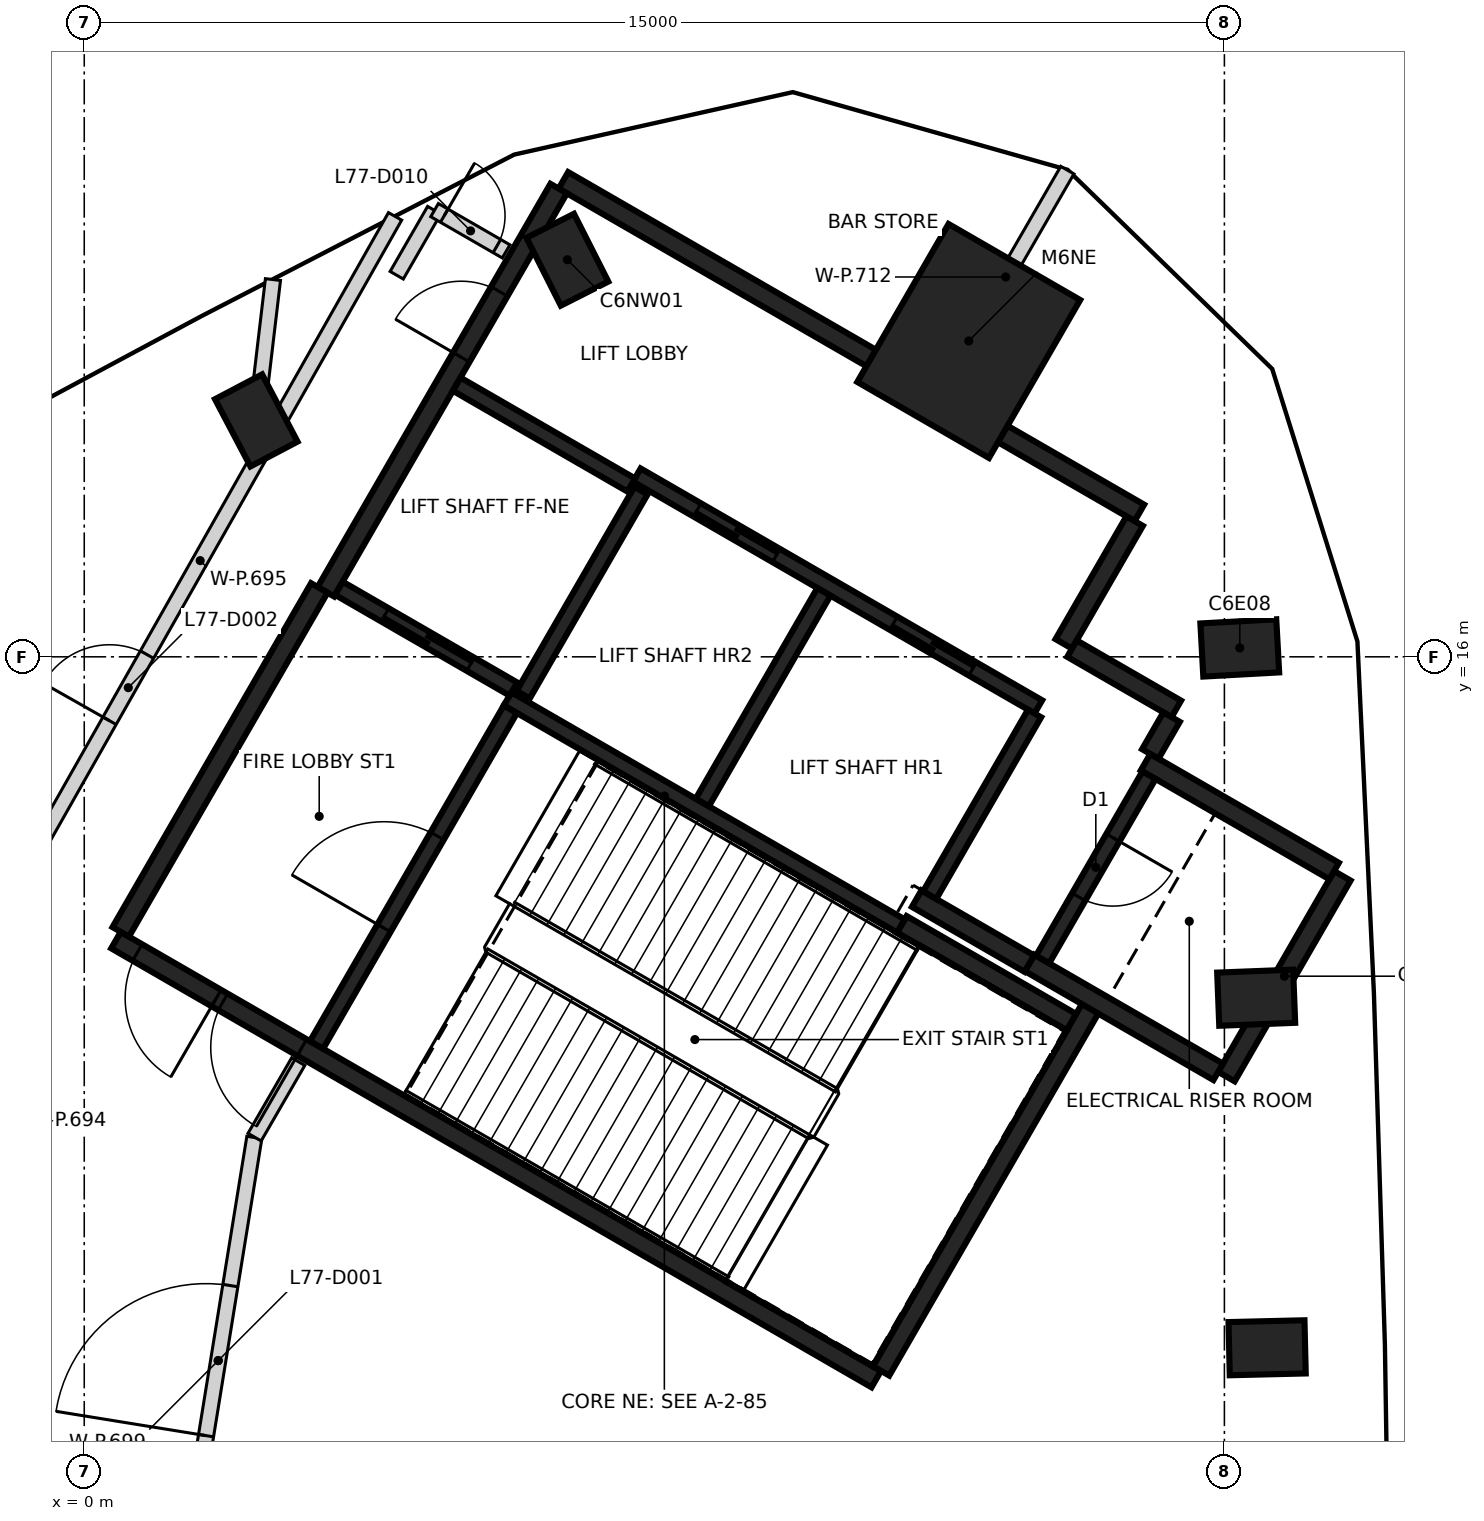
"""IFC4 building model, lengths in metres.
Left out: names, types, materials, properties, quantities, classifications, styles, units other than length and angle.
Written with IfcOpenShell. Run it as: python <this file> out.ifc"""

import sys

from ifc_helpers import new_model, si_unit, direction, frame, frame_2d, origin, origin_2d, place, context, subcontext, project, spatial, rectangle, extrude, element, fill, save


model = new_model("IFC4")
c1 = context("Model", 3, precision=1e-05, world=origin(), true_north=direction((0.0, 1.0)))
c2 = subcontext(c1, "Body", "Model", "MODEL_VIEW")
j1 = project(units=[si_unit("LENGTHUNIT", "METRE"), si_unit("PLANEANGLEUNIT", "RADIAN")], contexts=[c1])
p1 = place(None, origin())
s1 = spatial("IfcSite", under=j1, at=p1, CompositionType="ELEMENT")
p2 = place(p1, origin())
s2 = spatial("IfcBuilding", under=s1, at=p2, CompositionType="ELEMENT")
p3 = place(p2, frame((0.0, 0.0, 306.6)))
s3 = spatial("IfcBuildingStorey", under=s2, at=p3, CompositionType="ELEMENT", Elevation=306.6)
for number, where, z_axis, x_axis in (
    (1, (15.562, 6.91, -0.35), (0.0, 0.0, 1.0), (1.0, 0.024, 0.0)),
    (2, (15.418, 11.515, -0.35), (0.0, 0.0, 1.0), (0.999, 0.039, 0.0)),
    (3, (15.202, 16.117, -0.35), (0.0, 0.0, 1.0), (0.998, 0.055, 0.0)),
    (4, (6.356, 21.224, -0.35), (0.0, 0.0, 1.0), (-0.452, 0.892, 0.0)),
    (5, (2.263, 19.11, -0.35), (0.0, 0.0, 1.0), (-0.466, 0.885, 0.0)),
):
    element("IfcColumn", number, at=place(p3, frame(where, z_axis=z_axis, x_axis=x_axis)), inside=s3, PredefinedType="COLUMN", context=c2, shape_type="SweptSolid", body=[
        extrude(rectangle(XDim=1.0, YDim=0.7, at=origin_2d()), origin(), (0.0, 0.0, 1.0), 6.0),
    ])
p4 = place(p3, frame((11.637, 20.155, -0.35), z_axis=(0.0, 0.0, 1.0), x_axis=(0.5, 0.866025403784, 0.0)))
e6 = element("IfcColumn", 6, at=p4, inside=s3, PredefinedType="COLUMN", context=c2, shape_type="SweptSolid", body=[
    extrude(rectangle(XDim=2.4, YDim=2.0, at=origin_2d()), origin(), (0.0, 0.0, 1.0), 6.0),
])
p5 = place(p3, frame((10.42, 6.498, 0.0), z_axis=(0.0, 0.0, 1.0), x_axis=(-0.866021906294, 0.500006057782, 0.0)))
e7 = element("IfcWall", 7, at=p5, inside=s3, PredefinedType="SHEAR", context=c2, shape_type="SweptSolid", body=[
    extrude(rectangle(XDim=11.55, YDim=0.25, at=frame_2d((5.775, 0.0))), origin(), (0.0, 0.0, 1.0), 5.65),
])
p6 = place(p5, frame((10.025, 0.0, 0.0)))
e8 = element("IfcOpeningElement", 8, at=p6, cuts=e7, PredefinedType="OPENING", context=c2, shape_type="SweptSolid", body=[
    extrude(rectangle(XDim=1.2, YDim=2.1, at=frame_2d((0.6, 1.05))), frame((0.0, 0.135, 0.0), z_axis=(0.0, -1.0, 0.0), x_axis=(1.0, 0.0, 0.0)), (0.0, 0.0, 1.0), 0.27),
])
p7 = place(p5, frame((8.725, 0.0, 0.0)))
e9 = element("IfcOpeningElement", 9, at=p7, cuts=e7, PredefinedType="OPENING", context=c2, shape_type="SweptSolid", body=[
    extrude(rectangle(XDim=1.2, YDim=2.1, at=frame_2d((0.6, 1.05))), frame((0.0, 0.135, 0.0), z_axis=(0.0, -1.0, 0.0), x_axis=(1.0, 0.0, 0.0)), (0.0, 0.0, 1.0), 0.27),
])
p8 = place(p3, frame((6.304, 22.269, 0.0), z_axis=(0.0, 0.0, 1.0), x_axis=(0.866022959057, -0.500004234368, 0.0)))
e10 = element("IfcWall", 10, at=p8, inside=s3, PredefinedType="SHEAR", context=c2, shape_type="SweptSolid", body=[
    extrude(rectangle(XDim=8.75, YDim=0.25, at=frame_2d((4.375, 0.0))), origin(), (0.0, 0.0, 1.0), 5.65),
])
p9 = place(p3, frame((3.179, 16.856, 0.0), z_axis=(0.0, 0.0, 1.0), x_axis=(0.500001955336, 0.866024274868, 0.0)))
e11 = element("IfcWall", 11, at=p9, inside=s3, PredefinedType="SHEAR", context=c2, shape_type="SweptSolid", body=[
    extrude(rectangle(XDim=6.125, YDim=0.25, at=frame_2d((3.062, 0.0))), origin(), (0.0, 0.0, 1.0), 5.65),
])
p10 = place(p9, frame((3.563, 0.0, 0.0)))
e12 = element("IfcOpeningElement", 12, at=p10, cuts=e11, PredefinedType="OPENING", context=c2, shape_type="SweptSolid", body=[
    extrude(rectangle(XDim=1.0, YDim=2.1, at=frame_2d((0.5, 1.05))), frame((0.0, 0.135, 0.0), z_axis=(0.0, -1.0, 0.0), x_axis=(1.0, 0.0, 0.0)), (0.0, 0.0, 1.0), 0.27),
])
p11 = place(p3, frame((0.48, 12.381, 0.0), z_axis=(0.0, 0.0, 1.0), x_axis=(0.49999885962, 0.866026062182, 0.0)))
e13 = element("IfcWall", 13, at=p11, inside=s3, PredefinedType="SHEAR", context=c2, shape_type="SweptSolid", body=[
    extrude(rectangle(XDim=5.225, YDim=0.25, at=frame_2d((2.612, 0.0))), origin(), (0.0, 0.0, 1.0), 5.65),
])
p12 = place(p3, frame((13.238, 11.378, 0.0), z_axis=(0.0, 0.0, 1.0), x_axis=(-0.500008851346, -0.866020293397, 0.0)))
e14 = element("IfcWall", 14, at=p12, inside=s3, PredefinedType="SHEAR", context=c2, shape_type="SweptSolid", body=[
    extrude(rectangle(XDim=5.51, YDim=0.25, at=frame_2d((2.755, 0.0))), origin(), (0.0, 0.0, 1.0), 5.65),
])
p13 = place(p3, frame((16.552, 13.119, 0.0), z_axis=(0.0, 0.0, 1.0), x_axis=(-0.499978833458, -0.866037623948, 0.0)))
e15 = element("IfcWall", 15, at=p13, inside=s3, PredefinedType="SHEAR", context=c2, shape_type="SweptSolid", body=[
    extrude(rectangle(XDim=3.05, YDim=0.25, at=frame_2d((1.525, 0.0))), origin(), (0.0, 0.0, 1.0), 5.65),
])
p14 = place(p3, frame((14.918, 10.54, 0.0), z_axis=(0.0, 0.0, 1.0), x_axis=(-0.866063538972, 0.499933942099, 0.0)))
e16 = element("IfcWall", 16, at=p14, inside=s3, PredefinedType="SHEAR", context=c2, shape_type="SweptSolid", body=[
    extrude(rectangle(XDim=2.865, YDim=0.25, at=frame_2d((1.432, 0.0))), origin(), (0.0, 0.0, 1.0), 5.65),
])
p15 = place(p3, frame((13.963, 14.614, 0.0), z_axis=(0.0, 0.0, 1.0), x_axis=(0.866042235819, -0.499970844928, 0.0)))
e17 = element("IfcWall", 17, at=p15, inside=s3, PredefinedType="SHEAR", context=c2, shape_type="SweptSolid", body=[
    extrude(rectangle(XDim=2.865, YDim=0.25, at=frame_2d((1.432, 0.0))), origin(), (0.0, 0.0, 1.0), 5.65),
])
p16 = place(p3, frame((10.757, 12.481, 0.0), z_axis=(0.0, 0.0, 1.0), x_axis=(0.866022940537, -0.500004266446, 0.0)))
e18 = element("IfcWall", 18, at=p16, inside=s3, PredefinedType="SHEAR", context=c2, shape_type="SweptSolid", body=[
    extrude(rectangle(XDim=2.575, YDim=0.25, at=frame_2d((1.287, 0.0))), origin(), (0.0, 0.0, 1.0), 5.65),
])
p17 = place(p3, frame((13.819, 17.785, 0.0), z_axis=(0.0, 0.0, 1.0), x_axis=(-0.500039802285, -0.866002422705, 0.0)))
e19 = element("IfcWall", 19, at=p17, inside=s3, PredefinedType="SHEAR", context=c2, shape_type="SweptSolid", body=[
    extrude(rectangle(XDim=1.865, YDim=0.25, at=frame_2d((0.932, 0.0))), origin(), (0.0, 0.0, 1.0), 5.65),
])
p18 = place(p3, frame((12.433, 11.964, 0.0), z_axis=(0.0, 0.0, 1.0), x_axis=(-0.866038183914, 0.499977863513, 0.0)))
e20 = element("IfcWall", 20, at=p18, inside=s3, PredefinedType="SHEAR", context=c2, shape_type="SweptSolid", body=[
    extrude(rectangle(XDim=1.71, YDim=0.25, at=frame_2d((0.855, 0.0))), origin(), (0.0, 0.0, 1.0), 5.65),
])
p19 = place(p3, frame((12.995, 16.108, 0.0), z_axis=(0.0, 0.0, 1.0), x_axis=(0.866044474677, -0.49996696679, 0.0)))
e21 = element("IfcWall", 21, at=p19, inside=s3, PredefinedType="SHEAR", context=c2, shape_type="SweptSolid", body=[
    extrude(rectangle(XDim=1.584, YDim=0.25, at=frame_2d((0.792, 0.0))), origin(), (0.0, 0.0, 1.0), 5.65),
])
p20 = place(p3, frame((14.305, 15.207, 0.0), z_axis=(0.0, 0.0, 1.0), x_axis=(-0.499848422343, -0.866112899501, 0.0)))
e22 = element("IfcWall", 22, at=p20, inside=s3, PredefinedType="SHEAR", context=c2, shape_type="SweptSolid", body=[
    extrude(rectangle(XDim=0.559, YDim=0.25, at=frame_2d((0.28, 0.0))), origin(), (0.0, 0.0, 1.0), 5.65),
])
p21 = place(p3, frame((12.552, 15.342, 0.0), z_axis=(0.0, 0.0, 1.0), x_axis=(-0.866030299012, 0.499991521122, 0.0)))
e23 = element("IfcWall", 23, at=p21, inside=s3, PredefinedType="SHEAR", context=c2, shape_type="SweptSolid", body=[
    extrude(rectangle(XDim=6.1, YDim=0.2, at=frame_2d((3.05, 0.0))), origin(), (0.0, 0.0, 1.0), 5.65),
])
p22 = place(p21, frame((1.0, 0.0, 0.0)))
e24 = element("IfcOpeningElement", 24, at=p22, cuts=e23, PredefinedType="OPENING", context=c2, shape_type="SweptSolid", body=[
    extrude(rectangle(XDim=1.2, YDim=2.1, at=frame_2d((0.6, 1.05))), frame((0.0, 0.11, 0.0), z_axis=(0.0, -1.0, 0.0), x_axis=(1.0, 0.0, 0.0)), (0.0, 0.0, 1.0), 0.22),
])
p23 = place(p21, frame((3.982, 0.0, 0.0)))
e25 = element("IfcOpeningElement", 25, at=p23, cuts=e23, PredefinedType="OPENING", context=c2, shape_type="SweptSolid", body=[
    extrude(rectangle(XDim=1.2, YDim=2.1, at=frame_2d((0.6, 1.05))), frame((0.0, 0.11, 0.0), z_axis=(0.0, -1.0, 0.0), x_axis=(1.0, 0.0, 0.0)), (0.0, 0.0, 1.0), 0.22),
])
p24 = place(p3, frame((10.743, 12.46, 0.0), z_axis=(0.0, 0.0, 1.0), x_axis=(-0.866018848283, 0.500011354289, 0.0)))
e26 = element("IfcWall", 26, at=p24, inside=s3, PredefinedType="SHEAR", context=c2, shape_type="SweptSolid", body=[
    extrude(rectangle(XDim=5.974, YDim=0.2, at=frame_2d((2.987, 0.0))), origin(), (0.0, 0.0, 1.0), 5.65),
])
p25 = place(p3, frame((3.057, 10.895, 0.0), z_axis=(0.0, 0.0, 1.0), x_axis=(0.500027839223, 0.866009330205, 0.0)))
e27 = element("IfcWall", 27, at=p25, inside=s3, PredefinedType="SHEAR", context=c2, shape_type="SweptSolid", body=[
    extrude(rectangle(XDim=5.098, YDim=0.2, at=frame_2d((2.549, 0.0))), origin(), (0.0, 0.0, 1.0), 5.65),
])
p26 = place(p25, frame((1.774, 0.0, 0.0)))
e28 = element("IfcOpeningElement", 28, at=p26, cuts=e27, PredefinedType="OPENING", context=c2, shape_type="SweptSolid", body=[
    extrude(rectangle(XDim=1.4, YDim=2.1, at=frame_2d((0.7, 1.05))), frame((0.0, 0.11, 0.0), z_axis=(0.0, -1.0, 0.0), x_axis=(1.0, 0.0, 0.0)), (0.0, 0.0, 1.0), 0.22),
])
p27 = place(p3, frame((8.132, 14.084, 0.0), z_axis=(0.0, 0.0, 1.0), x_axis=(0.500030834389, 0.86600760081, 0.0)))
e29 = element("IfcWall", 29, at=p27, inside=s3, PredefinedType="SHEAR", context=c2, shape_type="SweptSolid", body=[
    extrude(rectangle(XDim=3.198, YDim=0.2, at=frame_2d((1.599, 0.0))), origin(), (0.0, 0.0, 1.0), 5.65),
])
p28 = place(p3, frame((14.008, 14.442, 0.0), z_axis=(0.0, 0.0, 1.0), x_axis=(-0.499986818241, -0.866033014143, 0.0)))
e30 = element("IfcWall", 30, at=p28, inside=s3, PredefinedType="SHEAR", context=c2, shape_type="SweptSolid", body=[
    extrude(rectangle(XDim=2.798, YDim=0.2, at=frame_2d((1.399, 0.0))), origin(), (0.0, 0.0, 1.0), 5.65),
])
p29 = place(p28, frame((0.949, 0.0, 0.0)))
e31 = element("IfcOpeningElement", 31, at=p29, cuts=e30, PredefinedType="OPENING", context=c2, shape_type="SweptSolid", body=[
    extrude(rectangle(XDim=0.9, YDim=2.1, at=frame_2d((0.45, 1.05))), frame((0.0, 0.11, 0.0), z_axis=(0.0, -1.0, 0.0), x_axis=(1.0, 0.0, 0.0)), (0.0, 0.0, 1.0), 0.22),
])
p30 = place(p3, frame((12.502, 15.255, 0.0), z_axis=(0.0, 0.0, 1.0), x_axis=(-0.499965018551, -0.866045599391, 0.0)))
e32 = element("IfcWall", 32, at=p30, inside=s3, PredefinedType="SHEAR", context=c2, shape_type="SweptSolid", body=[
    extrude(rectangle(XDim=2.759, YDim=0.2, at=frame_2d((1.379, 0.0))), origin(), (0.0, 0.0, 1.0), 5.65),
])
p31 = place(p3, frame((7.324, 18.187, 0.0), z_axis=(0.0, 0.0, 1.0), x_axis=(-0.499967891604, -0.866043940782, 0.0)))
e33 = element("IfcWall", 33, at=p31, inside=s3, PredefinedType="SHEAR", context=c2, shape_type="SweptSolid", body=[
    extrude(rectangle(XDim=3.1, YDim=0.2, at=frame_2d((1.55, 0.0))), origin(), (0.0, 0.0, 1.0), 5.65),
])
p32 = place(p3, frame((5.646, 15.576, 0.0), z_axis=(0.0, 0.0, 1.0), x_axis=(-0.866018407898, 0.500012117035, 0.0)))
e34 = element("IfcWall", 34, at=p32, inside=s3, PredefinedType="SHEAR", context=c2, shape_type="SweptSolid", body=[
    extrude(rectangle(XDim=2.651, YDim=0.2, at=frame_2d((1.325, 0.0))), origin(), (0.0, 0.0, 1.0), 5.65),
])
p33 = place(p32, frame((0.652, 0.0, 0.0)))
e35 = element("IfcOpeningElement", 35, at=p33, cuts=e34, PredefinedType="OPENING", context=c2, shape_type="SweptSolid", body=[
    extrude(rectangle(XDim=1.3, YDim=2.1, at=frame_2d((0.65, 1.05))), frame((0.0, 0.11, 0.0), z_axis=(0.0, -1.0, 0.0), x_axis=(1.0, 0.0, 0.0)), (0.0, 0.0, 1.0), 0.22),
])
p34 = place(p3, frame((7.196, 18.26, 0.0), z_axis=(0.0, 0.0, 1.0), x_axis=(-0.866018407898, 0.500012117035, 0.0)))
e36 = element("IfcWall", 36, at=p34, inside=s3, PredefinedType="SHEAR", context=c2, shape_type="SweptSolid", body=[
    extrude(rectangle(XDim=2.651, YDim=0.2, at=frame_2d((1.325, 0.0))), origin(), (0.0, 0.0, 1.0), 5.65),
])
p35 = place(p3, frame((-1.039, 12.736, 0.0), z_axis=(0.0, 0.0, 1.0), x_axis=(0.492629053188, 0.870239401518, 0.0)))
e37 = element("IfcWall", 37, at=p35, inside=s3, PredefinedType="PARTITIONING", context=c2, shape_type="SweptSolid", body=[
    extrude(rectangle(XDim=10.409, YDim=0.2, at=frame_2d((5.205, 0.0))), origin(), (0.0, 0.0, 1.0), 4.75),
])
p36 = place(p35, frame((2.784, 0.0, 0.0)))
e38 = element("IfcOpeningElement", 38, at=p36, cuts=e37, PredefinedType="OPENING", context=c2, shape_type="SweptSolid", body=[
    extrude(rectangle(XDim=1.0, YDim=2.1, at=frame_2d((0.5, 1.05))), frame((0.0, 0.11, 0.0), z_axis=(0.0, -1.0, 0.0), x_axis=(1.0, 0.0, 0.0)), (0.0, 0.0, 1.0), 0.22),
])
p37 = place(p3, frame((1.287, 3.806, 0.0), z_axis=(0.0, 0.0, 1.0), x_axis=(0.159910062187, 0.987131587992, 0.0)))
e39 = element("IfcWall", 39, at=p37, inside=s3, PredefinedType="PARTITIONING", context=c2, shape_type="SweptSolid", body=[
    extrude(rectangle(XDim=5.947, YDim=0.2, at=frame_2d((2.973, 0.0))), origin(), (0.0, 0.0, 1.0), 5.65),
])
p38 = place(p37, frame((1.973, 0.0, 0.0)))
e40 = element("IfcOpeningElement", 40, at=p38, cuts=e39, PredefinedType="OPENING", context=c2, shape_type="SweptSolid", body=[
    extrude(rectangle(XDim=2.0, YDim=2.1, at=frame_2d((1.0, 1.05))), frame((0.0, 0.11, 0.0), z_axis=(0.0, -1.0, 0.0), x_axis=(1.0, 0.0, 0.0)), (0.0, 0.0, 1.0), 0.22),
])
p39 = place(p3, frame((2.243, 18.939, 0.0), z_axis=(0.0, 0.0, 1.0), x_axis=(0.11751540525, 0.993071059657, 0.0)))
e41 = element("IfcWall", 41, at=p39, inside=s3, PredefinedType="PARTITIONING", context=c2, shape_type="SweptSolid", body=[
    extrude(rectangle(XDim=2.038, YDim=0.2, at=frame_2d((1.019, 0.0))), origin(), (0.0, 0.0, 1.0), 5.65),
])
p40 = place(p3, frame((2.241, 9.681, 0.0), z_axis=(0.0, 0.0, 1.0), x_axis=(0.500507931288, 0.865731950847, 0.0)))
e42 = element("IfcWall", 42, at=p40, inside=s3, PredefinedType="PARTITIONING", context=c2, shape_type="SweptSolid", body=[
    extrude(rectangle(XDim=1.148, YDim=0.2, at=frame_2d((0.574, 0.0))), origin(), (0.0, 0.0, 1.0), 5.65),
])
p41 = place(p3, frame((4.111, 21.02, 0.0), z_axis=(0.0, 0.0, 1.0), x_axis=(0.499037571515, 0.866580349545, 0.0)))
e43 = element("IfcWall", 43, at=p41, inside=s3, PredefinedType="PARTITIONING", context=c2, shape_type="SweptSolid", body=[
    extrude(rectangle(XDim=0.988, YDim=0.2, at=frame_2d((0.494, 0.0))), origin(), (0.0, 0.0, 1.0), 5.65),
])
p42 = place(p3, frame((4.609, 21.877, 0.0), z_axis=(0.0, 0.0, 1.0), x_axis=(0.866107068482, -0.499858525911, 0.0)))
e44 = element("IfcWall", 44, at=p42, inside=s3, PredefinedType="PARTITIONING", context=c2, shape_type="SweptSolid", body=[
    extrude(rectangle(XDim=1.087, YDim=0.2, at=frame_2d((0.543, 0.0))), origin(), (0.0, 0.0, 1.0), 5.65),
])
p43 = place(p42, frame((0.147, 0.0, 0.0)))
e45 = element("IfcOpeningElement", 45, at=p43, cuts=e44, PredefinedType="OPENING", context=c2, shape_type="SweptSolid", body=[
    extrude(rectangle(XDim=0.8, YDim=2.1, at=frame_2d((0.4, 1.05))), frame((0.0, 0.11, 0.0), z_axis=(0.0, -1.0, 0.0), x_axis=(1.0, 0.0, 0.0)), (0.0, 0.0, 1.0), 0.22),
])
p44 = place(p3, frame((11.311, 19.591, 0.0), z_axis=(0.0, 0.0, 1.0), x_axis=(0.499843986188, 0.866115459666, 0.0)))
e46 = element("IfcWall", 46, at=p44, inside=s3, PredefinedType="PARTITIONING", context=c2, shape_type="SweptSolid", body=[
    extrude(rectangle(XDim=3.246, YDim=0.2, at=frame_2d((1.623, 0.0))), origin(), (0.0, 0.0, 1.0), 5.65),
])
p45 = place(p33, origin())
e47 = element("IfcDoor", 47, at=p45, inside=s3, OperationType="SLIDING_TO_LEFT", PredefinedType="DOOR", context=c2, shape_type="SweptSolid", body=[
    extrude(rectangle(XDim=1.3, YDim=2.1, at=frame_2d((0.65, 1.05))), frame((0.0, 0.025, 0.0), z_axis=(0.0, -1.0, 0.0), x_axis=(1.0, 0.0, 0.0)), (0.0, 0.0, 1.0), 0.05),
])
fill(e35, e47)
p46 = place(p22, origin())
e48 = element("IfcDoor", 48, at=p46, inside=s3, OperationType="DOUBLE_DOOR_SLIDING", PredefinedType="DOOR", context=c2, shape_type="SweptSolid", body=[
    extrude(rectangle(XDim=1.2, YDim=2.1, at=frame_2d((0.6, 1.05))), frame((0.0, 0.025, 0.0), z_axis=(0.0, -1.0, 0.0), x_axis=(1.0, 0.0, 0.0)), (0.0, 0.0, 1.0), 0.05),
])
fill(e24, e48)
p47 = place(p23, origin())
e49 = element("IfcDoor", 49, at=p47, inside=s3, OperationType="DOUBLE_DOOR_SLIDING", PredefinedType="DOOR", context=c2, shape_type="SweptSolid", body=[
    extrude(rectangle(XDim=1.2, YDim=2.1, at=frame_2d((0.6, 1.05))), frame((0.0, 0.025, 0.0), z_axis=(0.0, -1.0, 0.0), x_axis=(1.0, 0.0, 0.0)), (0.0, 0.0, 1.0), 0.05),
])
fill(e25, e49)
p48 = place(p10, origin())
e50 = element("IfcDoor", 50, at=p48, inside=s3, OperationType="SINGLE_SWING_LEFT", PredefinedType="DOOR", context=c2, shape_type="SweptSolid", body=[
    extrude(rectangle(XDim=1.0, YDim=2.1, at=frame_2d((0.5, 1.05))), frame((0.0, 0.025, 0.0), z_axis=(0.0, -1.0, 0.0), x_axis=(1.0, 0.0, 0.0)), (0.0, 0.0, 1.0), 0.05),
])
fill(e12, e50)
p49 = place(p6, origin())
e51 = element("IfcDoor", 51, at=p49, inside=s3, OperationType="SINGLE_SWING_LEFT", PredefinedType="DOOR", context=c2, shape_type="SweptSolid", body=[
    extrude(rectangle(XDim=1.2, YDim=2.1, at=frame_2d((0.6, 1.05))), frame((0.0, 0.025, 0.0), z_axis=(0.0, -1.0, 0.0), x_axis=(1.0, 0.0, 0.0)), (0.0, 0.0, 1.0), 0.05),
])
fill(e8, e51)
p50 = place(p7, origin())
e52 = element("IfcDoor", 52, at=p50, inside=s3, OperationType="SINGLE_SWING_RIGHT", PredefinedType="DOOR", context=c2, shape_type="SweptSolid", body=[
    extrude(rectangle(XDim=1.2, YDim=2.1, at=frame_2d((0.6, 1.05))), frame((0.0, 0.025, 0.0), z_axis=(0.0, -1.0, 0.0), x_axis=(1.0, 0.0, 0.0)), (0.0, 0.0, 1.0), 0.05),
])
fill(e9, e52)
p51 = place(p26, origin())
e53 = element("IfcDoor", 53, at=p51, inside=s3, OperationType="SINGLE_SWING_LEFT", PredefinedType="DOOR", context=c2, shape_type="SweptSolid", body=[
    extrude(rectangle(XDim=1.4, YDim=2.1, at=frame_2d((0.7, 1.05))), frame((0.0, 0.025, 0.0), z_axis=(0.0, -1.0, 0.0), x_axis=(1.0, 0.0, 0.0)), (0.0, 0.0, 1.0), 0.05),
])
fill(e28, e53)
p52 = place(p29, origin())
e54 = element("IfcDoor", 54, at=p52, inside=s3, OperationType="SINGLE_SWING_RIGHT", PredefinedType="DOOR", context=c2, shape_type="SweptSolid", body=[
    extrude(rectangle(XDim=0.9, YDim=2.1, at=frame_2d((0.45, 1.05))), frame((0.0, 0.025, 0.0), z_axis=(0.0, -1.0, 0.0), x_axis=(1.0, 0.0, 0.0)), (0.0, 0.0, 1.0), 0.05),
])
fill(e31, e54)
p53 = place(p38, frame((2.0, 0.0, 0.0), z_axis=(0.0, 0.0, 1.0), x_axis=(-1.0, 0.0, 0.0)))
e55 = element("IfcDoor", 55, at=p53, inside=s3, OperationType="DOUBLE_DOOR_SINGLE_SWING", PredefinedType="DOOR", context=c2, shape_type="SweptSolid", body=[
    extrude(rectangle(XDim=2.0, YDim=2.1, at=frame_2d((1.0, 1.05))), frame((0.0, 0.025, 0.0), z_axis=(0.0, -1.0, 0.0), x_axis=(1.0, 0.0, 0.0)), (0.0, 0.0, 1.0), 0.05),
])
fill(e40, e55)
p54 = place(p36, origin())
e56 = element("IfcDoor", 56, at=p54, inside=s3, OperationType="SINGLE_SWING_LEFT", PredefinedType="DOOR", context=c2, shape_type="SweptSolid", body=[
    extrude(rectangle(XDim=1.0, YDim=2.1, at=frame_2d((0.5, 1.05))), frame((0.0, 0.025, 0.0), z_axis=(0.0, -1.0, 0.0), x_axis=(1.0, 0.0, 0.0)), (0.0, 0.0, 1.0), 0.05),
])
fill(e38, e56)
p55 = place(p43, origin())
e57 = element("IfcDoor", 57, at=p55, inside=s3, OperationType="SINGLE_SWING_LEFT", PredefinedType="DOOR", context=c2, shape_type="SweptSolid", body=[
    extrude(rectangle(XDim=0.8, YDim=2.1, at=frame_2d((0.4, 1.05))), frame((0.0, 0.025, 0.0), z_axis=(0.0, -1.0, 0.0), x_axis=(1.0, 0.0, 0.0)), (0.0, 0.0, 1.0), 0.05),
])
fill(e45, e57)
save(model, sys.argv[1])
